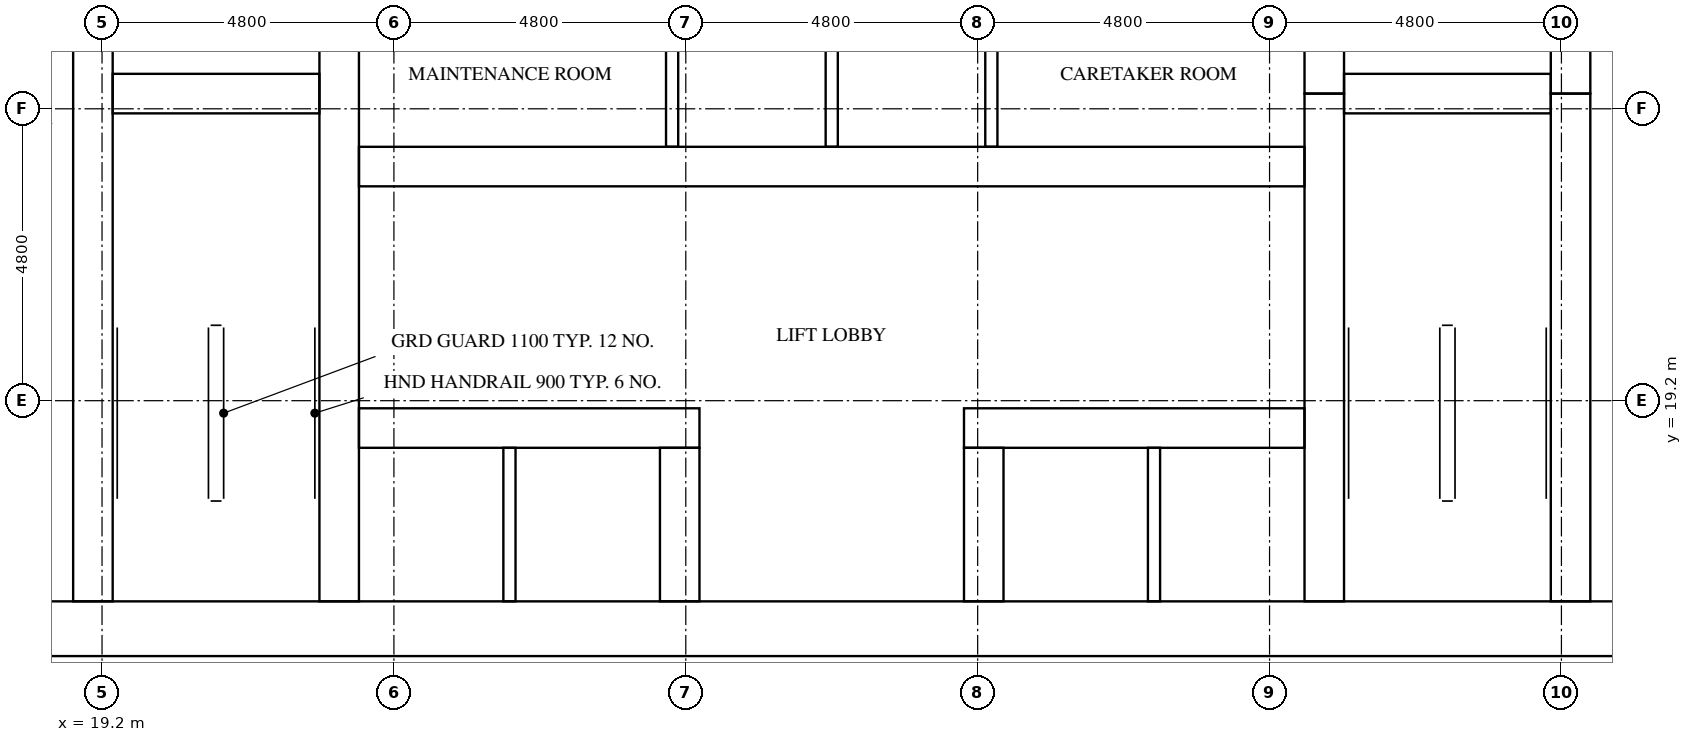
"""IFC4 building model, lengths in metres.
Left out: names, types, materials, properties, quantities, classifications, styles, units other than length and angle.
Written with IfcOpenShell. Run it as: python <this file> out.ifc"""

import sys

from ifc_helpers import new_model, si_unit, direction, frame, frame_2d, origin, place, context, subcontext, project, spatial, rectangle, extrude, element, fill, save


model = new_model("IFC4")
c1 = context("Model", 3, precision=1e-05, world=origin(), true_north=direction((0.0, 1.0)))
c2 = subcontext(c1, "Body", "Model", "MODEL_VIEW")
j1 = project(units=[si_unit("LENGTHUNIT", "METRE"), si_unit("PLANEANGLEUNIT", "RADIAN")], contexts=[c1])
p1 = place(None, origin())
s1 = spatial("IfcSite", under=j1, at=p1, CompositionType="ELEMENT")
p2 = place(p1, origin())
s2 = spatial("IfcBuilding", under=s1, at=p2, CompositionType="ELEMENT")
p3 = place(p2, frame((0.0, 0.0, 96.2)))
s3 = spatial("IfcBuildingStorey", under=s2, at=p3, CompositionType="ELEMENT", Elevation=96.2)
p4 = place(p3, frame((15.0, 15.45, 0.0), z_axis=(0.0, 0.0, 1.0), x_axis=(1.0, 0.0, 0.0)))
e1 = element("IfcWall", 1, at=p4, inside=s3, PredefinedType="SHEAR", context=c2, shape_type="SweptSolid", body=[
    extrude(rectangle(XDim=32.4, YDim=0.9, at=frame_2d((16.2, 0.0))), origin(), (0.0, 0.0, 1.0), 3.2),
])
p5 = place(p4, frame((15.3, 0.0, 0.0)))
e2 = element("IfcOpeningElement", 2, at=p5, cuts=e1, PredefinedType="OPENING", context=c2, shape_type="SweptSolid", body=[
    extrude(rectangle(XDim=1.8, YDim=2.1, at=frame_2d((0.9, 1.05))), frame((0.0, 0.46, 0.0), z_axis=(0.0, -1.0, 0.0), x_axis=(1.0, 0.0, 0.0)), (0.0, 0.0, 1.0), 0.92),
])
p6 = place(p3, frame((19.05, 15.9, 0.0), z_axis=(0.0, 0.0, 1.0), x_axis=(0.0, 1.0, 0.0)))
e3 = element("IfcWall", 3, at=p6, inside=s3, PredefinedType="SHEAR", context=c2, shape_type="SweptSolid", body=[
    extrude(rectangle(XDim=15.025, YDim=0.65, at=frame_2d((7.513, 0.0))), origin(), (0.0, 0.0, 1.0), 3.2),
])
p7 = place(p6, frame((9.55, 0.0, 0.0)))
e4 = element("IfcOpeningElement", 4, at=p7, cuts=e3, PredefinedType="OPENING", context=c2, shape_type="SweptSolid", body=[
    extrude(rectangle(XDim=1.1, YDim=2.1, at=frame_2d((0.55, 1.05))), frame((0.0, 0.335, 0.0), z_axis=(0.0, -1.0, 0.0), x_axis=(1.0, 0.0, 0.0)), (0.0, 0.0, 1.0), 0.67),
])
p8 = place(p6, frame((13.05, 0.0, 0.0)))
e5 = element("IfcOpeningElement", 5, at=p8, cuts=e3, PredefinedType="OPENING", context=c2, shape_type="SweptSolid", body=[
    extrude(rectangle(XDim=1.1, YDim=2.1, at=frame_2d((0.55, 1.05))), frame((0.0, 0.335, 0.0), z_axis=(0.0, -1.0, 0.0), x_axis=(1.0, 0.0, 0.0)), (0.0, 0.0, 1.0), 0.67),
])
p9 = place(p6, frame((0.3, 0.0, 0.0)))
e6 = element("IfcOpeningElement", 6, at=p9, cuts=e3, PredefinedType="OPENING", context=c2, shape_type="SweptSolid", body=[
    extrude(rectangle(XDim=1.2, YDim=2.1, at=frame_2d((0.6, 1.05))), frame((0.0, 0.335, 0.0), z_axis=(0.0, -1.0, 0.0), x_axis=(1.0, 0.0, 0.0)), (0.0, 0.0, 1.0), 0.67),
])
p10 = place(p3, frame((23.1, 15.9, 0.0), z_axis=(0.0, 0.0, 1.0), x_axis=(0.0, 1.0, 0.0)))
e7 = element("IfcWall", 7, at=p10, inside=s3, PredefinedType="SHEAR", context=c2, shape_type="SweptSolid", body=[
    extrude(rectangle(XDim=21.0, YDim=0.65, at=frame_2d((10.5, 0.0))), origin(), (0.0, 0.0, 1.0), 3.2),
])
p11 = place(p3, frame((39.3, 15.9, 0.0), z_axis=(0.0, 0.0, 1.0), x_axis=(0.0, 1.0, 0.0)))
e8 = element("IfcWall", 8, at=p11, inside=s3, PredefinedType="SHEAR", context=c2, shape_type="SweptSolid", body=[
    extrude(rectangle(XDim=8.35, YDim=0.65, at=frame_2d((4.175, 0.0))), origin(), (0.0, 0.0, 1.0), 3.2),
])
p12 = place(p3, frame((39.3, 24.25, 0.0), z_axis=(0.0, 0.0, 1.0), x_axis=(0.0, 1.0, 0.0)))
e9 = element("IfcWall", 9, at=p12, inside=s3, PredefinedType="SHEAR", context=c2, shape_type="SweptSolid", body=[
    extrude(rectangle(XDim=3.5, YDim=0.65, at=frame_2d((1.75, 0.0))), origin(), (0.0, 0.0, 1.0), 3.2),
])
p13 = place(p3, frame((43.35, 15.9, 0.0), z_axis=(0.0, 0.0, 1.0), x_axis=(0.0, 1.0, 0.0)))
e10 = element("IfcWall", 10, at=p13, inside=s3, PredefinedType="SHEAR", context=c2, shape_type="SweptSolid", body=[
    extrude(rectangle(XDim=8.35, YDim=0.65, at=frame_2d((4.175, 0.0))), origin(), (0.0, 0.0, 1.0), 3.2),
])
p14 = place(p13, frame((0.3, 0.0, 0.0)))
e11 = element("IfcOpeningElement", 11, at=p14, cuts=e10, PredefinedType="OPENING", context=c2, shape_type="SweptSolid", body=[
    extrude(rectangle(XDim=1.2, YDim=2.1, at=frame_2d((0.6, 1.05))), frame((0.0, 0.335, 0.0), z_axis=(0.0, -1.0, 0.0), x_axis=(1.0, 0.0, 0.0)), (0.0, 0.0, 1.0), 0.67),
])
p15 = place(p3, frame((43.35, 24.25, 0.0), z_axis=(0.0, 0.0, 1.0), x_axis=(0.0, 1.0, 0.0)))
e12 = element("IfcWall", 12, at=p15, inside=s3, PredefinedType="SHEAR", context=c2, shape_type="SweptSolid", body=[
    extrude(rectangle(XDim=3.5, YDim=0.65, at=frame_2d((1.75, 0.0))), origin(), (0.0, 0.0, 1.0), 3.2),
])
p16 = place(p15, frame((1.2, 0.0, 0.0)))
e13 = element("IfcOpeningElement", 13, at=p16, cuts=e12, PredefinedType="OPENING", context=c2, shape_type="SweptSolid", body=[
    extrude(rectangle(XDim=1.1, YDim=2.1, at=frame_2d((0.55, 1.05))), frame((0.0, 0.335, 0.0), z_axis=(0.0, -1.0, 0.0), x_axis=(1.0, 0.0, 0.0)), (0.0, 0.0, 1.0), 0.67),
])
for number, where, z_axis, x_axis in (
    (14, (19.375, 24.25, 0.0), (0.0, 0.0, 1.0), (1.0, 0.0, 0.0)),
    (15, (39.625, 24.25, 0.0), (0.0, 0.0, 1.0), (1.0, 0.0, 0.0)),
):
    element("IfcWall", number, at=place(p3, frame(where, z_axis=z_axis, x_axis=x_axis)), inside=s3, PredefinedType="SHEAR", context=c2, shape_type="SweptSolid", body=[
        extrude(rectangle(XDim=3.4, YDim=0.65, at=frame_2d((1.7, 0.0))), origin(), (0.0, 0.0, 1.0), 3.2),
    ])
p17 = place(p3, frame((23.425, 18.75, 0.0), z_axis=(0.0, 0.0, 1.0), x_axis=(1.0, 0.0, 0.0)))
e16 = element("IfcWall", 16, at=p17, inside=s3, PredefinedType="SHEAR", context=c2, shape_type="SweptSolid", body=[
    extrude(rectangle(XDim=5.6, YDim=0.65, at=frame_2d((2.8, 0.0))), origin(), (0.0, 0.0, 1.0), 3.2),
])
p18 = place(p17, frame((0.637, 0.0, 0.0)))
e17 = element("IfcOpeningElement", 17, at=p18, cuts=e16, PredefinedType="OPENING", context=c2, shape_type="SweptSolid", body=[
    extrude(rectangle(XDim=1.1, YDim=2.1, at=frame_2d((0.55, 1.05))), frame((0.0, 0.335, 0.0), z_axis=(0.0, -1.0, 0.0), x_axis=(1.0, 0.0, 0.0)), (0.0, 0.0, 1.0), 0.67),
])
p19 = place(p17, frame((3.212, 0.0, 0.0)))
e18 = element("IfcOpeningElement", 18, at=p19, cuts=e16, PredefinedType="OPENING", context=c2, shape_type="SweptSolid", body=[
    extrude(rectangle(XDim=1.1, YDim=2.1, at=frame_2d((0.55, 1.05))), frame((0.0, 0.335, 0.0), z_axis=(0.0, -1.0, 0.0), x_axis=(1.0, 0.0, 0.0)), (0.0, 0.0, 1.0), 0.67),
])
p20 = place(p3, frame((33.375, 18.75, 0.0), z_axis=(0.0, 0.0, 1.0), x_axis=(1.0, 0.0, 0.0)))
e19 = element("IfcWall", 19, at=p20, inside=s3, PredefinedType="SHEAR", context=c2, shape_type="SweptSolid", body=[
    extrude(rectangle(XDim=5.6, YDim=0.65, at=frame_2d((2.8, 0.0))), origin(), (0.0, 0.0, 1.0), 3.2),
])
p21 = place(p20, frame((1.288, 0.0, 0.0)))
e20 = element("IfcOpeningElement", 20, at=p21, cuts=e19, PredefinedType="OPENING", context=c2, shape_type="SweptSolid", body=[
    extrude(rectangle(XDim=1.1, YDim=2.1, at=frame_2d((0.55, 1.05))), frame((0.0, 0.335, 0.0), z_axis=(0.0, -1.0, 0.0), x_axis=(1.0, 0.0, 0.0)), (0.0, 0.0, 1.0), 0.67),
])
p22 = place(p20, frame((3.863, 0.0, 0.0)))
e21 = element("IfcOpeningElement", 21, at=p22, cuts=e19, PredefinedType="OPENING", context=c2, shape_type="SweptSolid", body=[
    extrude(rectangle(XDim=1.1, YDim=2.1, at=frame_2d((0.55, 1.05))), frame((0.0, 0.335, 0.0), z_axis=(0.0, -1.0, 0.0), x_axis=(1.0, 0.0, 0.0)), (0.0, 0.0, 1.0), 0.67),
])
p23 = place(p3, frame((23.425, 23.05, 0.0), z_axis=(0.0, 0.0, 1.0), x_axis=(1.0, 0.0, 0.0)))
e22 = element("IfcWall", 22, at=p23, inside=s3, PredefinedType="SHEAR", context=c2, shape_type="SweptSolid", body=[
    extrude(rectangle(XDim=15.55, YDim=0.65, at=frame_2d((7.775, 0.0))), origin(), (0.0, 0.0, 1.0), 3.2),
])
p24 = place(p23, frame((2.025, 0.0, 0.0)))
e23 = element("IfcOpeningElement", 23, at=p24, cuts=e22, PredefinedType="OPENING", context=c2, shape_type="SweptSolid", body=[
    extrude(rectangle(XDim=1.0, YDim=2.1, at=frame_2d((0.5, 1.05))), frame((0.0, 0.335, 0.0), z_axis=(0.0, -1.0, 0.0), x_axis=(1.0, 0.0, 0.0)), (0.0, 0.0, 1.0), 0.67),
])
p25 = place(p23, frame((12.525, 0.0, 0.0)))
e24 = element("IfcOpeningElement", 24, at=p25, cuts=e22, PredefinedType="OPENING", context=c2, shape_type="SweptSolid", body=[
    extrude(rectangle(XDim=1.0, YDim=2.1, at=frame_2d((0.5, 1.05))), frame((0.0, 0.335, 0.0), z_axis=(0.0, -1.0, 0.0), x_axis=(1.0, 0.0, 0.0)), (0.0, 0.0, 1.0), 0.67),
])
for number, where, z_axis, x_axis in (
    (25, (28.7, 15.9, 0.0), (0.0, 0.0, 1.0), (0.0, 1.0, 0.0)),
    (26, (33.7, 15.9, 0.0), (0.0, 0.0, 1.0), (0.0, 1.0, 0.0)),
):
    element("IfcWall", number, at=place(p3, frame(where, z_axis=z_axis, x_axis=x_axis)), inside=s3, PredefinedType="SHEAR", context=c2, shape_type="SweptSolid", body=[
        extrude(rectangle(XDim=2.525, YDim=0.65, at=frame_2d((1.263, 0.0))), origin(), (0.0, 0.0, 1.0), 3.2),
    ])
for number, where, z_axis, x_axis in (
    (27, (28.575, 23.375, 0.0), (0.0, 0.0, 1.0), (0.0, 1.0, 0.0)),
    (28, (31.2, 23.375, 0.0), (0.0, 0.0, 1.0), (0.0, 1.0, 0.0)),
    (29, (33.825, 23.375, 0.0), (0.0, 0.0, 1.0), (0.0, 1.0, 0.0)),
):
    element("IfcWall", number, at=place(p3, frame(where, z_axis=z_axis, x_axis=x_axis)), inside=s3, PredefinedType="SOLIDWALL", context=c2, shape_type="SweptSolid", body=[
        extrude(rectangle(XDim=2.45, YDim=0.2, at=frame_2d((1.225, 0.0))), origin(), (0.0, 0.0, 1.0), 3.2),
    ])
for number, where, z_axis, x_axis in (
    (30, (25.9, 15.9, 0.0), (0.0, 0.0, 1.0), (0.0, 1.0, 0.0)),
    (31, (36.5, 15.9, 0.0), (0.0, 0.0, 1.0), (0.0, 1.0, 0.0)),
):
    element("IfcWall", number, at=place(p3, frame(where, z_axis=z_axis, x_axis=x_axis)), inside=s3, PredefinedType="SOLIDWALL", context=c2, shape_type="SweptSolid", body=[
        extrude(rectangle(XDim=2.525, YDim=0.2, at=frame_2d((1.263, 0.0))), origin(), (0.0, 0.0, 1.0), 3.2),
    ])
p26 = place(p18, origin())
e32 = element("IfcDoor", 32, at=p26, inside=s3, OperationType="DOUBLE_DOOR_SLIDING", PredefinedType="DOOR", context=c2, shape_type="SweptSolid", body=[
    extrude(rectangle(XDim=1.1, YDim=2.1, at=frame_2d((0.55, 1.05))), frame((0.0, 0.025, 0.0), z_axis=(0.0, -1.0, 0.0), x_axis=(1.0, 0.0, 0.0)), (0.0, 0.0, 1.0), 0.05),
])
fill(e17, e32)
p27 = place(p19, origin())
e33 = element("IfcDoor", 33, at=p27, inside=s3, OperationType="DOUBLE_DOOR_SLIDING", PredefinedType="DOOR", context=c2, shape_type="SweptSolid", body=[
    extrude(rectangle(XDim=1.1, YDim=2.1, at=frame_2d((0.55, 1.05))), frame((0.0, 0.025, 0.0), z_axis=(0.0, -1.0, 0.0), x_axis=(1.0, 0.0, 0.0)), (0.0, 0.0, 1.0), 0.05),
])
fill(e18, e33)
p28 = place(p21, origin())
e34 = element("IfcDoor", 34, at=p28, inside=s3, OperationType="DOUBLE_DOOR_SLIDING", PredefinedType="DOOR", context=c2, shape_type="SweptSolid", body=[
    extrude(rectangle(XDim=1.1, YDim=2.1, at=frame_2d((0.55, 1.05))), frame((0.0, 0.025, 0.0), z_axis=(0.0, -1.0, 0.0), x_axis=(1.0, 0.0, 0.0)), (0.0, 0.0, 1.0), 0.05),
])
fill(e20, e34)
p29 = place(p22, origin())
e35 = element("IfcDoor", 35, at=p29, inside=s3, OperationType="DOUBLE_DOOR_SLIDING", PredefinedType="DOOR", context=c2, shape_type="SweptSolid", body=[
    extrude(rectangle(XDim=1.1, YDim=2.1, at=frame_2d((0.55, 1.05))), frame((0.0, 0.025, 0.0), z_axis=(0.0, -1.0, 0.0), x_axis=(1.0, 0.0, 0.0)), (0.0, 0.0, 1.0), 0.05),
])
fill(e21, e35)
p30 = place(p9, frame((1.2, 0.0, 0.0), z_axis=(0.0, 0.0, 1.0), x_axis=(-1.0, 0.0, 0.0)))
e36 = element("IfcDoor", 36, at=p30, inside=s3, OperationType="SINGLE_SWING_RIGHT", PredefinedType="DOOR", context=c2, shape_type="SweptSolid", body=[
    extrude(rectangle(XDim=1.2, YDim=2.1, at=frame_2d((0.6, 1.05))), frame((0.0, 0.025, 0.0), z_axis=(0.0, -1.0, 0.0), x_axis=(1.0, 0.0, 0.0)), (0.0, 0.0, 1.0), 0.05),
])
fill(e6, e36)
p31 = place(p14, origin())
e37 = element("IfcDoor", 37, at=p31, inside=s3, OperationType="SINGLE_SWING_LEFT", PredefinedType="DOOR", context=c2, shape_type="SweptSolid", body=[
    extrude(rectangle(XDim=1.2, YDim=2.1, at=frame_2d((0.6, 1.05))), frame((0.0, 0.025, 0.0), z_axis=(0.0, -1.0, 0.0), x_axis=(1.0, 0.0, 0.0)), (0.0, 0.0, 1.0), 0.05),
])
fill(e11, e37)
p32 = place(p5, frame((1.8, 0.0, 0.0), z_axis=(0.0, 0.0, 1.0), x_axis=(-1.0, 0.0, 0.0)))
e38 = element("IfcDoor", 38, at=p32, inside=s3, OperationType="DOUBLE_DOOR_SINGLE_SWING", PredefinedType="DOOR", context=c2, shape_type="SweptSolid", body=[
    extrude(rectangle(XDim=1.8, YDim=2.1, at=frame_2d((0.9, 1.05))), frame((0.0, 0.025, 0.0), z_axis=(0.0, -1.0, 0.0), x_axis=(1.0, 0.0, 0.0)), (0.0, 0.0, 1.0), 0.05),
])
fill(e2, e38)
p33 = place(p24, frame((1.0, 0.0, 0.0), z_axis=(0.0, 0.0, 1.0), x_axis=(-1.0, 0.0, 0.0)))
e39 = element("IfcDoor", 39, at=p33, inside=s3, OperationType="SINGLE_SWING_LEFT", PredefinedType="DOOR", context=c2, shape_type="SweptSolid", body=[
    extrude(rectangle(XDim=1.0, YDim=2.1, at=frame_2d((0.5, 1.05))), frame((0.0, 0.025, 0.0), z_axis=(0.0, -1.0, 0.0), x_axis=(1.0, 0.0, 0.0)), (0.0, 0.0, 1.0), 0.05),
])
fill(e23, e39)
p34 = place(p25, frame((1.0, 0.0, 0.0), z_axis=(0.0, 0.0, 1.0), x_axis=(-1.0, 0.0, 0.0)))
e40 = element("IfcDoor", 40, at=p34, inside=s3, OperationType="SINGLE_SWING_RIGHT", PredefinedType="DOOR", context=c2, shape_type="SweptSolid", body=[
    extrude(rectangle(XDim=1.0, YDim=2.1, at=frame_2d((0.5, 1.05))), frame((0.0, 0.025, 0.0), z_axis=(0.0, -1.0, 0.0), x_axis=(1.0, 0.0, 0.0)), (0.0, 0.0, 1.0), 0.05),
])
fill(e24, e40)
save(model, sys.argv[1])
